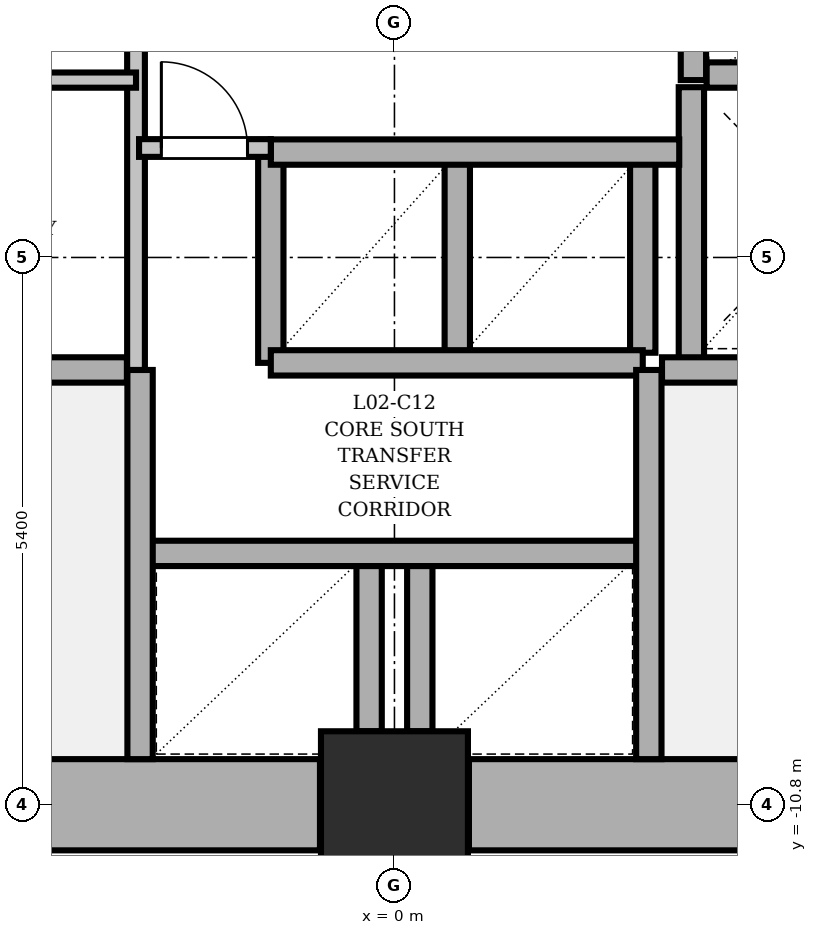
"""IFC4 building model, lengths in metres.
Left out: names, types, materials, properties, quantities, classifications, styles, units other than length and angle.
Written with IfcOpenShell. Run it as: python <this file> out.ifc"""

import sys

from ifc_helpers import new_model, si_unit, direction, frame, frame_2d, origin, origin_2d, place, context, subcontext, project, spatial, rectangle, extrude, element, fill, save


model = new_model("IFC4")
c1 = context("Model", 3, precision=1e-05, world=origin(), true_north=direction((0.0, 1.0)))
c2 = subcontext(c1, "Body", "Model", "MODEL_VIEW")
j1 = project(units=[si_unit("LENGTHUNIT", "METRE"), si_unit("PLANEANGLEUNIT", "RADIAN")], contexts=[c1])
p1 = place(None, origin())
s1 = spatial("IfcSite", under=j1, at=p1, CompositionType="ELEMENT")
p2 = place(p1, origin())
s2 = spatial("IfcBuilding", under=s1, at=p2, CompositionType="ELEMENT")
p3 = place(p2, frame((0.0, 0.0, 9.0)))
s3 = spatial("IfcBuildingStorey", under=s2, at=p3, CompositionType="ELEMENT", Elevation=9.0)
p4 = place(p3, frame((0.0, -10.8, 0.0), z_axis=(0.0, 0.0, 1.0), x_axis=(1.0, 0.0, 0.0)))
e1 = element("IfcColumn", 1, at=p4, inside=s3, PredefinedType="COLUMN", context=c2, shape_type="SweptSolid", body=[
    extrude(rectangle(XDim=1.45, YDim=1.45, at=origin_2d()), origin(), (0.0, 0.0, 1.0), 4.5),
])
for number, where, z_axis, x_axis in (
    (2, (-4.665, -10.8, 0.0), (0.0, 0.0, 1.0), (1.0, 0.0, 0.0)),
    (3, (0.735, -10.8, 0.0), (0.0, 0.0, 1.0), (1.0, 0.0, 0.0)),
):
    element("IfcWall", number, at=place(p3, frame(where, z_axis=z_axis, x_axis=x_axis)), inside=s3, PredefinedType="SHEAR", context=c2, shape_type="SweptSolid", body=[
        extrude(rectangle(XDim=3.93, YDim=0.9, at=frame_2d((1.965, 0.0))), origin(), (0.0, 0.0, 1.0), 4.5),
    ])
p5 = place(p3, frame((2.93, -6.51, 0.0), z_axis=(0.0, 0.0, 1.0), x_axis=(0.0, 1.0, 0.0)))
e4 = element("IfcWall", 4, at=p5, inside=s3, PredefinedType="SHEAR", context=c2, shape_type="SweptSolid", body=[
    extrude(rectangle(XDim=2.79, YDim=0.25, at=frame_2d((1.395, 0.0))), origin(), (0.0, 0.0, 1.0), 4.5),
])
p6 = place(p3, frame((3.08, -3.6, 0.0), z_axis=(0.0, 0.0, 1.0), x_axis=(1.0, 0.0, 0.0)))
e5 = element("IfcWall", 5, at=p6, inside=s3, PredefinedType="SHEAR", context=c2, shape_type="SweptSolid", body=[
    extrude(rectangle(XDim=2.37, YDim=0.25, at=frame_2d((1.185, 0.0))), origin(), (0.0, 0.0, 1.0), 4.5),
])
for number, where, z_axis, x_axis in (
    (6, (0.62, -6.34, 0.0), (0.0, 0.0, 1.0), (0.0, 1.0, 0.0)),
    (7, (2.45, -6.34, 0.0), (0.0, 0.0, 1.0), (0.0, 1.0, 0.0)),
):
    element("IfcWall", number, at=place(p3, frame(where, z_axis=z_axis, x_axis=x_axis)), inside=s3, PredefinedType="SHEAR", context=c2, shape_type="SweptSolid", body=[
        extrude(rectangle(XDim=1.88, YDim=0.25, at=frame_2d((0.94, 0.0))), origin(), (0.0, 0.0, 1.0), 4.5),
    ])
for number, where, z_axis, x_axis in (
    (8, (-0.25, -10.075, 0.0), (0.0, 0.0, 1.0), (0.0, 1.0, 0.0)),
    (9, (0.25, -10.075, 0.0), (0.0, 0.0, 1.0), (0.0, 1.0, 0.0)),
):
    element("IfcWall", number, at=place(p3, frame(where, z_axis=z_axis, x_axis=x_axis)), inside=s3, PredefinedType="SHEAR", context=c2, shape_type="SweptSolid", body=[
        extrude(rectangle(XDim=1.635, YDim=0.25, at=frame_2d((0.817, 0.0))), origin(), (0.0, 0.0, 1.0), 4.5),
    ])
p7 = place(p3, frame((-1.22, -6.44, 0.0), z_axis=(0.0, 0.0, 1.0), x_axis=(0.0, 1.0, 0.0)))
e10 = element("IfcWall", 10, at=p7, inside=s3, PredefinedType="SHEAR", context=c2, shape_type="SweptSolid", body=[
    extrude(rectangle(XDim=2.08, YDim=0.25, at=frame_2d((1.04, 0.0))), origin(), (0.0, 0.0, 1.0), 4.5),
])
p8 = place(p3, frame((-1.22, -6.44, 0.0), z_axis=(0.0, 0.0, 1.0), x_axis=(1.0, 0.0, 0.0)))
e11 = element("IfcWall", 11, at=p8, inside=s3, PredefinedType="SHEAR", context=c2, shape_type="SweptSolid", body=[
    extrude(rectangle(XDim=3.67, YDim=0.25, at=frame_2d((1.835, 0.0))), origin(), (0.0, 0.0, 1.0), 4.5),
])
p9 = place(p3, frame((-2.48, -8.32, 0.0), z_axis=(0.0, 0.0, 1.0), x_axis=(1.0, 0.0, 0.0)))
e12 = element("IfcWall", 12, at=p9, inside=s3, PredefinedType="SHEAR", context=c2, shape_type="SweptSolid", body=[
    extrude(rectangle(XDim=4.93, YDim=0.25, at=frame_2d((2.465, 0.0))), origin(), (0.0, 0.0, 1.0), 4.5),
])
p10 = place(p3, frame((-1.22, -4.36, 0.0), z_axis=(0.0, 0.0, 1.0), x_axis=(1.0, 0.0, 0.0)))
e13 = element("IfcWall", 13, at=p10, inside=s3, PredefinedType="SHEAR", context=c2, shape_type="SweptSolid", body=[
    extrude(rectangle(XDim=4.03, YDim=0.25, at=frame_2d((2.015, 0.0))), origin(), (0.0, 0.0, 1.0), 4.5),
])
p11 = place(p3, frame((2.95, -3.65, 0.0), z_axis=(0.0, 0.0, 1.0), x_axis=(0.0, 1.0, 0.0)))
e14 = element("IfcWall", 14, at=p11, inside=s3, PredefinedType="SHEAR", context=c2, shape_type="SweptSolid", body=[
    extrude(rectangle(XDim=2.4, YDim=0.25, at=frame_2d((1.2, 0.0))), origin(), (0.0, 0.0, 1.0), 4.5),
])
p12 = place(p11, frame((0.775, 0.0, 0.0)))
e15 = element("IfcOpeningElement", 15, at=p12, cuts=e14, PredefinedType="OPENING", context=c2, shape_type="SweptSolid", body=[
    extrude(rectangle(XDim=0.85, YDim=2.1, at=frame_2d((0.425, 1.05))), frame((0.0, 0.135, 0.0), z_axis=(0.0, -1.0, 0.0), x_axis=(1.0, 0.0, 0.0)), (0.0, 0.0, 1.0), 0.27),
])
p13 = place(p3, frame((2.64, -6.51, 0.0), z_axis=(0.0, 0.0, 1.0), x_axis=(1.0, 0.0, 0.0)))
e16 = element("IfcWall", 16, at=p13, inside=s3, PredefinedType="SHEAR", context=c2, shape_type="SweptSolid", body=[
    extrude(rectangle(XDim=7.7, YDim=0.25, at=frame_2d((3.85, 0.0))), origin(), (0.0, 0.0, 1.0), 4.5),
])
p14 = place(p13, frame((6.0, 0.0, 0.0)))
e17 = element("IfcOpeningElement", 17, at=p14, cuts=e16, PredefinedType="OPENING", context=c2, shape_type="SweptSolid", body=[
    extrude(rectangle(XDim=0.95, YDim=2.1, at=frame_2d((0.475, 1.05))), frame((0.0, 0.135, 0.0), z_axis=(0.0, -1.0, 0.0), x_axis=(1.0, 0.0, 0.0)), (0.0, 0.0, 1.0), 0.27),
])
for number, where, z_axis, x_axis in (
    (18, (2.51, -10.35, 0.0), (0.0, 0.0, 1.0), (0.0, 1.0, 0.0)),
    (19, (-2.51, -10.35, 0.0), (0.0, 0.0, 1.0), (0.0, 1.0, 0.0)),
):
    element("IfcWall", number, at=place(p3, frame(where, z_axis=z_axis, x_axis=x_axis)), inside=s3, PredefinedType="SHEAR", context=c2, shape_type="SweptSolid", body=[
        extrude(rectangle(XDim=3.84, YDim=0.25, at=frame_2d((1.92, 0.0))), origin(), (0.0, 0.0, 1.0), 4.5),
    ])
p15 = place(p3, frame((-10.34, -6.51, 0.0), z_axis=(0.0, 0.0, 1.0), x_axis=(1.0, 0.0, 0.0)))
e20 = element("IfcWall", 20, at=p15, inside=s3, PredefinedType="SHEAR", context=c2, shape_type="SweptSolid", body=[
    extrude(rectangle(XDim=7.7, YDim=0.25, at=frame_2d((3.85, 0.0))), origin(), (0.0, 0.0, 1.0), 4.5),
])
p16 = place(p15, frame((0.35, 0.0, 0.0)))
e21 = element("IfcOpeningElement", 21, at=p16, cuts=e20, PredefinedType="OPENING", context=c2, shape_type="SweptSolid", body=[
    extrude(rectangle(XDim=1.1, YDim=2.1, at=frame_2d((0.55, 1.05))), frame((0.0, 0.135, 0.0), z_axis=(0.0, -1.0, 0.0), x_axis=(1.0, 0.0, 0.0)), (0.0, 0.0, 1.0), 0.27),
])
p17 = place(p3, frame((-2.55, -6.51, 0.0), z_axis=(0.0, 0.0, 1.0), x_axis=(0.0, 1.0, 0.0)))
e22 = element("IfcWall", 22, at=p17, inside=s3, PredefinedType="PARTITIONING", context=c2, shape_type="SweptSolid", body=[
    extrude(rectangle(XDim=5.16, YDim=0.175, at=frame_2d((2.58, 0.0))), origin(), (0.0, 0.0, 1.0), 4.25),
])
p18 = place(p17, frame((3.45, 0.0, 0.0)))
e23 = element("IfcOpeningElement", 23, at=p18, cuts=e22, PredefinedType="OPENING", context=c2, shape_type="SweptSolid", body=[
    extrude(rectangle(XDim=0.85, YDim=2.1, at=frame_2d((0.425, 1.05))), frame((0.0, 0.097, 0.0), z_axis=(0.0, -1.0, 0.0), x_axis=(1.0, 0.0, 0.0)), (0.0, 0.0, 1.0), 0.195),
])
p19 = place(p3, frame((-7.18, -3.65, 0.0), z_axis=(0.0, 0.0, 1.0), x_axis=(1.0, 0.0, 0.0)))
e24 = element("IfcWall", 24, at=p19, inside=s3, PredefinedType="PARTITIONING", context=c2, shape_type="SweptSolid", body=[
    extrude(rectangle(XDim=4.63, YDim=0.15, at=frame_2d((2.315, 0.0))), origin(), (0.0, 0.0, 1.0), 4.25),
])
p20 = place(p19, frame((1.0, 0.0, 0.0)))
e25 = element("IfcOpeningElement", 25, at=p20, cuts=e24, PredefinedType="OPENING", context=c2, shape_type="SweptSolid", body=[
    extrude(rectangle(XDim=0.85, YDim=2.1, at=frame_2d((0.425, 1.05))), frame((0.0, 0.085, 0.0), z_axis=(0.0, -1.0, 0.0), x_axis=(1.0, 0.0, 0.0)), (0.0, 0.0, 1.0), 0.17),
])
p21 = place(p3, frame((-2.52, -4.32, 0.0), z_axis=(0.0, 0.0, 1.0), x_axis=(1.0, 0.0, 0.0)))
e26 = element("IfcWall", 26, at=p21, inside=s3, PredefinedType="PARTITIONING", context=c2, shape_type="SweptSolid", body=[
    extrude(rectangle(XDim=1.3, YDim=0.175, at=frame_2d((0.65, 0.0))), origin(), (0.0, 0.0, 1.0), 4.25),
])
p22 = place(p21, frame((0.22, 0.0, 0.0)))
e27 = element("IfcOpeningElement", 27, at=p22, cuts=e26, PredefinedType="OPENING", context=c2, shape_type="SweptSolid", body=[
    extrude(rectangle(XDim=0.85, YDim=2.1, at=frame_2d((0.425, 1.05))), frame((0.0, 0.097, 0.0), z_axis=(0.0, -1.0, 0.0), x_axis=(1.0, 0.0, 0.0)), (0.0, 0.0, 1.0), 0.195),
])
p23 = place(p22, origin())
e28 = element("IfcDoor", 28, at=p23, inside=s3, OperationType="SINGLE_SWING_LEFT", PredefinedType="DOOR", context=c2, shape_type="SweptSolid", body=[
    extrude(rectangle(XDim=0.85, YDim=2.1, at=frame_2d((0.425, 1.05))), frame((0.0, 0.025, 0.0), z_axis=(0.0, -1.0, 0.0), x_axis=(1.0, 0.0, 0.0)), (0.0, 0.0, 1.0), 0.05),
])
fill(e27, e28)
save(model, sys.argv[1])
